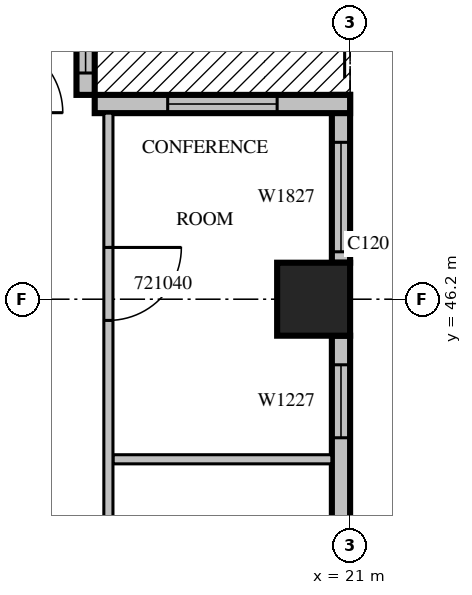
"""IFC4 building model, lengths in metres.
Left out: names, types, materials, properties, quantities, classifications, styles, units other than length and angle.
Written with IfcOpenShell. Run it as: python <this file> out.ifc"""

import sys

from ifc_helpers import new_model, si_unit, direction, frame, frame_2d, origin, origin_2d, place, context, subcontext, project, spatial, rectangle, extrude, source, transform, mapped, element, fill, save


model = new_model("IFC4")
c1 = context("Model", 3, precision=1e-05, world=origin(), true_north=direction((0.0, 1.0)))
c2 = subcontext(c1, "Body", "Model", "MODEL_VIEW")
j1 = project(units=[si_unit("LENGTHUNIT", "METRE"), si_unit("PLANEANGLEUNIT", "RADIAN")], contexts=[c1])
p1 = place(None, origin())
s1 = spatial("IfcSite", under=j1, at=p1, CompositionType="ELEMENT")
p2 = place(p1, origin())
s2 = spatial("IfcBuilding", under=s1, at=p2, CompositionType="ELEMENT")
p3 = place(p2, frame((0.0, 0.0, 99.3)))
s3 = spatial("IfcBuildingStorey", under=s2, at=p3, CompositionType="ELEMENT", Elevation=99.3)
m1 = source(origin(), c2, "Body", "SweptSolid", [
    extrude(rectangle(XDim=1.2, YDim=1.2, at=origin_2d()), origin(), (0.0, 0.0, 1.0), 4.2),
])
p4 = place(p3, frame((20.4, 46.2, 0.0), z_axis=(0.0, 0.0, 1.0), x_axis=(1.0, 0.0, 0.0)))
e1 = element("IfcColumn", 1, at=p4, inside=s3, PredefinedType="COLUMN", context=c2, shape_type="MappedRepresentation", body=[
    mapped(m1, transform((0.0, 0.0, 0.0), scale=1.0)),
])
m2 = source(origin(), c2, "Body", "SweptSolid", [
    extrude(rectangle(XDim=7.2, YDim=0.3, at=frame_2d((3.6, 0.0))), origin(), (0.0, 0.0, 1.0), 3.8),
])
p5 = place(p3, frame((20.85, 38.4, 0.0), z_axis=(0.0, 0.0, 1.0), x_axis=(0.0, 1.0, 0.0)))
e2 = element("IfcWall", 2, at=p5, inside=s3, PredefinedType="STANDARD", context=c2, shape_type="MappedRepresentation", body=[
    mapped(m2, transform((0.0, 0.0, 0.0), scale=1.0)),
])
m3 = source(origin(), c2, "Body", "SweptSolid", [
    extrude(rectangle(XDim=2.4, YDim=2.7, at=frame_2d((1.2, 1.35))), frame((0.0, 0.16, 0.0), z_axis=(0.0, -1.0, 0.0), x_axis=(1.0, 0.0, 0.0)), (0.0, 0.0, 1.0), 0.32),
])
p6 = place(p5, frame((0.3, 0.0, 0.6)))
e3 = element("IfcOpeningElement", 3, at=p6, cuts=e2, PredefinedType="OPENING", context=c2, shape_type="MappedRepresentation", body=[
    mapped(m3, transform((0.0, 0.0, 0.0), scale=1.0)),
])
m4 = source(origin(), c2, "Body", "SweptSolid", [
    extrude(rectangle(XDim=1.2, YDim=2.7, at=frame_2d((0.6, 1.35))), frame((0.0, 0.16, 0.0), z_axis=(0.0, -1.0, 0.0), x_axis=(1.0, 0.0, 0.0)), (0.0, 0.0, 1.0), 0.32),
])
p7 = place(p5, frame((5.521, 0.0, 0.6)))
e4 = element("IfcOpeningElement", 4, at=p7, cuts=e2, PredefinedType="OPENING", context=c2, shape_type="MappedRepresentation", body=[
    mapped(m4, transform((0.0, 0.0, 0.0), scale=1.0)),
])
m5 = source(origin(), c2, "Body", "SweptSolid", [
    extrude(rectangle(XDim=2.76, YDim=0.3, at=frame_2d((1.38, 0.0))), origin(), (0.0, 0.0, 1.0), 3.8),
])
p8 = place(p3, frame((20.85, 46.8, 0.0), z_axis=(0.0, 0.0, 1.0), x_axis=(0.0, 1.0, 0.0)))
e5 = element("IfcWall", 5, at=p8, inside=s3, PredefinedType="STANDARD", context=c2, shape_type="MappedRepresentation", body=[
    mapped(m5, transform((0.0, 0.0, 0.0), scale=1.0)),
])
m6 = source(origin(), c2, "Body", "SweptSolid", [
    extrude(rectangle(XDim=1.8, YDim=2.7, at=frame_2d((0.9, 1.35))), frame((0.0, 0.16, 0.0), z_axis=(0.0, -1.0, 0.0), x_axis=(1.0, 0.0, 0.0)), (0.0, 0.0, 1.0), 0.32),
])
p9 = place(p8, frame((0.18, 0.0, 0.6)))
e6 = element("IfcOpeningElement", 6, at=p9, cuts=e5, PredefinedType="OPENING", context=c2, shape_type="MappedRepresentation", body=[
    mapped(m6, transform((0.0, 0.0, 0.0), scale=1.0)),
])
m7 = source(origin(), c2, "Body", "SweptSolid", [
    extrude(rectangle(XDim=4.2, YDim=0.3, at=frame_2d((2.1, 0.0))), origin(), (0.0, 0.0, 1.0), 3.8),
])
p10 = place(p3, frame((21.0, 49.41, 0.0), z_axis=(0.0, 0.0, 1.0), x_axis=(-1.0, 0.0, 0.0)))
e7 = element("IfcWall", 7, at=p10, inside=s3, PredefinedType="STANDARD", context=c2, shape_type="MappedRepresentation", body=[
    mapped(m7, transform((0.0, 0.0, 0.0), scale=1.0)),
])
m8 = source(origin(), c2, "Body", "SweptSolid", [
    extrude(rectangle(XDim=1.8, YDim=2.4, at=frame_2d((0.9, 1.2))), frame((0.0, 0.16, 0.0), z_axis=(0.0, -1.0, 0.0), x_axis=(1.0, 0.0, 0.0)), (0.0, 0.0, 1.0), 0.32),
])
p11 = place(p10, frame((1.2, 0.0, 0.0)))
e8 = element("IfcOpeningElement", 8, at=p11, cuts=e7, PredefinedType="OPENING", context=c2, shape_type="MappedRepresentation", body=[
    mapped(m8, transform((0.0, 0.0, 0.0), scale=1.0)),
])
m9 = source(origin(), c2, "Body", "SweptSolid", [
    extrude(rectangle(XDim=2.52, YDim=0.3, at=frame_2d((1.26, 0.0))), origin(), (0.0, 0.0, 1.0), 3.8),
])
p12 = place(p3, frame((16.65, 49.56, 0.0), z_axis=(0.0, 0.0, 1.0), x_axis=(0.0, 1.0, 0.0)))
e9 = element("IfcWall", 9, at=p12, inside=s3, PredefinedType="STANDARD", context=c2, shape_type="MappedRepresentation", body=[
    mapped(m9, transform((0.0, 0.0, 0.0), scale=1.0)),
])
p13 = place(p12, frame((0.36, 0.0, 0.0)))
e10 = element("IfcOpeningElement", 10, at=p13, cuts=e9, PredefinedType="OPENING", context=c2, shape_type="MappedRepresentation", body=[
    mapped(m8, transform((0.0, 0.0, 0.0), scale=1.0)),
])
m10 = source(origin(), c2, "Body", "SweptSolid", [
    extrude(rectangle(XDim=3.6, YDim=0.15, at=frame_2d((1.8, 0.0))), origin(), (0.0, 0.0, 1.0), 3.8),
])
p14 = place(p3, frame((17.1, 43.568, 0.0), z_axis=(0.0, 0.0, 1.0), x_axis=(1.0, 0.0, 0.0)))
e11 = element("IfcWall", 11, at=p14, inside=s3, PredefinedType="PARTITIONING", context=c2, shape_type="MappedRepresentation", body=[
    mapped(m10, transform((0.0, 0.0, 0.0), scale=1.0)),
])
p15 = place(p3, frame((17.025, 49.26, 0.0), z_axis=(0.0, 0.0, 1.0), x_axis=(0.0, -1.0, 0.0)))
e12 = element("IfcWall", 12, at=p15, inside=s3, PredefinedType="PARTITIONING", context=c2, shape_type="SweptSolid", body=[
    extrude(rectangle(XDim=19.86, YDim=0.15, at=frame_2d((9.93, 0.0))), origin(), (0.0, 0.0, 1.0), 3.8),
])
m11 = source(origin(), c2, "Body", "SweptSolid", [
    extrude(rectangle(XDim=1.0, YDim=2.1, at=frame_2d((0.5, 1.05))), frame((0.0, 0.085, 0.0), z_axis=(0.0, -1.0, 0.0), x_axis=(1.0, 0.0, 0.0)), (0.0, 0.0, 1.0), 0.17),
])
p16 = place(p15, frame((17.503, 0.0, 0.0)))
e13 = element("IfcOpeningElement", 13, at=p16, cuts=e12, PredefinedType="OPENING", context=c2, shape_type="MappedRepresentation", body=[
    mapped(m11, transform((0.0, 0.0, 0.0), scale=1.0)),
])
p17 = place(p15, frame((14.191, 0.0, 0.0)))
e14 = element("IfcOpeningElement", 14, at=p17, cuts=e12, PredefinedType="OPENING", context=c2, shape_type="MappedRepresentation", body=[
    mapped(m11, transform((0.0, 0.0, 0.0), scale=1.0)),
])
p18 = place(p15, frame((11.848, 0.0, 0.0)))
e15 = element("IfcOpeningElement", 15, at=p18, cuts=e12, PredefinedType="OPENING", context=c2, shape_type="MappedRepresentation", body=[
    mapped(m11, transform((0.0, 0.0, 0.0), scale=1.0)),
])
m12 = source(origin(), c2, "Body", "SweptSolid", [
    extrude(rectangle(XDim=1.2, YDim=2.1, at=frame_2d((0.6, 1.05))), frame((0.0, 0.085, 0.0), z_axis=(0.0, -1.0, 0.0), x_axis=(1.0, 0.0, 0.0)), (0.0, 0.0, 1.0), 0.17),
])
p19 = place(p15, frame((7.976, 0.0, 0.0)))
e16 = element("IfcOpeningElement", 16, at=p19, cuts=e12, PredefinedType="OPENING", context=c2, shape_type="MappedRepresentation", body=[
    mapped(m12, transform((0.0, 0.0, 0.0), scale=1.0)),
])
p20 = place(p15, frame((2.209, 0.0, 0.0)))
e17 = element("IfcOpeningElement", 17, at=p20, cuts=e12, PredefinedType="OPENING", context=c2, shape_type="MappedRepresentation", body=[
    mapped(m12, transform((0.0, 0.0, 0.0), scale=1.0)),
])
m13 = source(origin(), c2, "Body", "SweptSolid", [
    extrude(rectangle(XDim=1.2, YDim=2.7, at=frame_2d((0.6, 1.35))), frame((0.0, 0.03, 0.0), z_axis=(0.0, -1.0, 0.0), x_axis=(1.0, 0.0, 0.0)), (0.0, 0.0, 1.0), 0.06),
])
p21 = place(p7, origin())
e18 = element("IfcWindow", 18, at=p21, inside=s3, PartitioningType="SINGLE_PANEL", PredefinedType="WINDOW", context=c2, shape_type="MappedRepresentation", body=[
    mapped(m13, transform((0.0, 0.0, 0.0), scale=1.0)),
])
fill(e4, e18)
m14 = source(origin(), c2, "Body", "SweptSolid", [
    extrude(rectangle(XDim=1.8, YDim=2.7, at=frame_2d((0.9, 1.35))), frame((0.0, 0.03, 0.0), z_axis=(0.0, -1.0, 0.0), x_axis=(1.0, 0.0, 0.0)), (0.0, 0.0, 1.0), 0.06),
])
p22 = place(p9, origin())
e19 = element("IfcWindow", 19, at=p22, inside=s3, PartitioningType="SINGLE_PANEL", PredefinedType="WINDOW", context=c2, shape_type="MappedRepresentation", body=[
    mapped(m14, transform((0.0, 0.0, 0.0), scale=1.0)),
])
fill(e6, e19)
m15 = source(origin(), c2, "Body", "SweptSolid", [
    extrude(rectangle(XDim=1.8, YDim=2.4, at=frame_2d((0.9, 1.2))), frame((0.0, 0.025, 0.0), z_axis=(0.0, -1.0, 0.0), x_axis=(1.0, 0.0, 0.0)), (0.0, 0.0, 1.0), 0.05),
])
p23 = place(p11, origin())
e20 = element("IfcDoor", 20, at=p23, inside=s3, OperationType="SLIDING_TO_LEFT", PredefinedType="DOOR", context=c2, shape_type="MappedRepresentation", body=[
    mapped(m15, transform((0.0, 0.0, 0.0), scale=1.0)),
])
fill(e8, e20)
p24 = place(p13, origin())
e21 = element("IfcDoor", 21, at=p24, inside=s3, OperationType="SLIDING_TO_LEFT", PredefinedType="DOOR", context=c2, shape_type="MappedRepresentation", body=[
    mapped(m15, transform((0.0, 0.0, 0.0), scale=1.0)),
])
fill(e10, e21)
m16 = source(origin(), c2, "Body", "SweptSolid", [
    extrude(rectangle(XDim=1.2, YDim=2.1, at=frame_2d((0.6, 1.05))), frame((0.0, 0.025, 0.0), z_axis=(0.0, -1.0, 0.0), x_axis=(1.0, 0.0, 0.0)), (0.0, 0.0, 1.0), 0.05),
])
p25 = place(p20, origin())
e22 = element("IfcDoor", 22, at=p25, inside=s3, OperationType="SINGLE_SWING_LEFT", PredefinedType="DOOR", context=c2, shape_type="MappedRepresentation", body=[
    mapped(m16, transform((0.0, 0.0, 0.0), scale=1.0)),
])
fill(e17, e22)
save(model, sys.argv[1])
